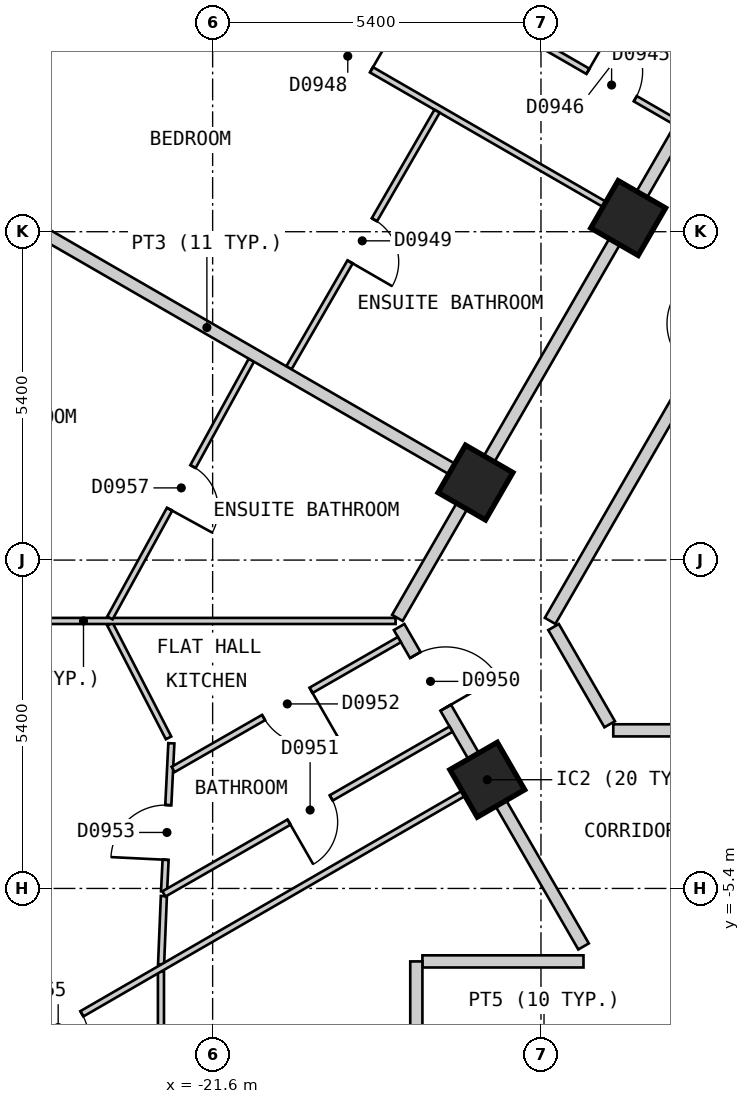
"""IFC4 building model, lengths in metres.
Left out: names, types, materials, properties, quantities, classifications, styles, units other than length and angle.
Written with IfcOpenShell. Run it as: python <this file> out.ifc"""

import sys

from ifc_helpers import new_model, si_unit, direction, frame, frame_2d, origin, origin_2d, place, context, subcontext, project, spatial, polyline, rectangle, outline, extrude, element, fill, save


model = new_model("IFC4")
c1 = context("Model", 3, precision=1e-05, world=origin(), true_north=direction((0.0, 1.0)))
c2 = subcontext(c1, "Body", "Model", "MODEL_VIEW")
j1 = project(units=[si_unit("LENGTHUNIT", "METRE"), si_unit("PLANEANGLEUNIT", "RADIAN")], contexts=[c1])
p1 = place(None, origin())
s1 = spatial("IfcSite", under=j1, at=p1, CompositionType="ELEMENT")
p2 = place(p1, origin())
s2 = spatial("IfcBuilding", under=s1, at=p2, CompositionType="ELEMENT")
p3 = place(p2, frame((0.0, 0.0, 102.0)))
s3 = spatial("IfcBuildingStorey", under=s2, at=p3, CompositionType="ELEMENT", Elevation=102.0)
for number, where, z_axis, x_axis in (
    (1, (-17.083, -3.612, 0.0), (0.0, 0.0, 1.0), (0.5, -0.866, 0.0)),
    (2, (-14.766, 5.625, 0.0), (0.0, 0.0, 1.0), (-0.5, -0.866, 0.0)),
    (3, (-17.277, 1.275, 0.0), (0.0, 0.0, 1.0), (-0.5, -0.866, 0.0)),
):
    element("IfcColumn", number, at=place(p3, frame(where, z_axis=z_axis, x_axis=x_axis)), inside=s3, PredefinedType="COLUMN", context=c2, shape_type="SweptSolid", body=[
        extrude(rectangle(XDim=0.9, YDim=0.9, at=origin_2d()), origin(), (0.0, 0.0, 1.0), 3.0),
    ])
p4 = place(p3, frame((-15.747, 24.425, 0.0), z_axis=(0.0, 0.0, 1.0), x_axis=(-0.500027479704, -0.866009537788, 0.0)))
e4 = element("IfcWall", 4, at=p4, inside=s3, PredefinedType="SOLIDWALL", context=c2, shape_type="SweptSolid", body=[
    extrude(outline(polyline([(0.0, -0.15), (26.559, -0.15), (26.478, 0.15), (0.08, 0.15), (0.0, -0.15)])), origin(), (0.0, 0.0, 1.0), 2.7),
])
p5 = place(p4, frame((2.483, 0.0, 0.15)))
e5 = element("IfcOpeningElement", 5, at=p5, cuts=e4, PredefinedType="OPENING", context=c2, shape_type="SweptSolid", body=[
    extrude(rectangle(XDim=1.5, YDim=2.1, at=frame_2d((0.75, 1.05))), frame((0.0, 0.16, 0.0), z_axis=(0.0, -1.0, 0.0), x_axis=(1.0, 0.0, 0.0)), (0.0, 0.0, 1.0), 0.32),
])
p6 = place(p4, frame((7.506, 0.0, 0.15)))
e6 = element("IfcOpeningElement", 6, at=p6, cuts=e4, PredefinedType="OPENING", context=c2, shape_type="SweptSolid", body=[
    extrude(rectangle(XDim=1.5, YDim=2.1, at=frame_2d((0.75, 1.05))), frame((0.0, 0.16, 0.0), z_axis=(0.0, -1.0, 0.0), x_axis=(1.0, 0.0, 0.0)), (0.0, 0.0, 1.0), 0.32),
])
p7 = place(p4, frame((12.529, 0.0, 0.15)))
e7 = element("IfcOpeningElement", 7, at=p7, cuts=e4, PredefinedType="OPENING", context=c2, shape_type="SweptSolid", body=[
    extrude(rectangle(XDim=1.5, YDim=2.1, at=frame_2d((0.75, 1.05))), frame((0.0, 0.16, 0.0), z_axis=(0.0, -1.0, 0.0), x_axis=(1.0, 0.0, 0.0)), (0.0, 0.0, 1.0), 0.32),
])
p8 = place(p4, frame((17.552, 0.0, 0.15)))
e8 = element("IfcOpeningElement", 8, at=p8, cuts=e4, PredefinedType="OPENING", context=c2, shape_type="SweptSolid", body=[
    extrude(rectangle(XDim=1.5, YDim=2.1, at=frame_2d((0.75, 1.05))), frame((0.0, 0.16, 0.0), z_axis=(0.0, -1.0, 0.0), x_axis=(1.0, 0.0, 0.0)), (0.0, 0.0, 1.0), 0.32),
])
p9 = place(p4, frame((22.575, 0.0, 0.15)))
e9 = element("IfcOpeningElement", 9, at=p9, cuts=e4, PredefinedType="OPENING", context=c2, shape_type="SweptSolid", body=[
    extrude(rectangle(XDim=1.5, YDim=2.1, at=frame_2d((0.75, 1.05))), frame((0.0, 0.16, 0.0), z_axis=(0.0, -1.0, 0.0), x_axis=(1.0, 0.0, 0.0)), (0.0, 0.0, 1.0), 0.32),
])
p10 = place(p3, frame((-29.027, -3.425, 0.0), z_axis=(0.0, 0.0, 1.0), x_axis=(0.500035407905, -0.866004960056, 0.0)))
e10 = element("IfcWall", 10, at=p10, inside=s3, PredefinedType="SOLIDWALL", context=c2, shape_type="SweptSolid", body=[
    extrude(outline(polyline([(0.0, -0.15), (23.094, -0.15), (23.014, 0.15), (0.08, 0.15), (0.0, -0.15)])), origin(), (0.0, 0.0, 1.0), 2.7),
])
p11 = place(p10, frame((2.677, 0.0, 0.15)))
e11 = element("IfcOpeningElement", 11, at=p11, cuts=e10, PredefinedType="OPENING", context=c2, shape_type="SweptSolid", body=[
    extrude(rectangle(XDim=1.5, YDim=2.1, at=frame_2d((0.75, 1.05))), frame((0.0, 0.16, 0.0), z_axis=(0.0, -1.0, 0.0), x_axis=(1.0, 0.0, 0.0)), (0.0, 0.0, 1.0), 0.32),
])
p12 = place(p10, frame((8.091, 0.0, 0.15)))
e12 = element("IfcOpeningElement", 12, at=p12, cuts=e10, PredefinedType="OPENING", context=c2, shape_type="SweptSolid", body=[
    extrude(rectangle(XDim=1.5, YDim=2.1, at=frame_2d((0.75, 1.05))), frame((0.0, 0.16, 0.0), z_axis=(0.0, -1.0, 0.0), x_axis=(1.0, 0.0, 0.0)), (0.0, 0.0, 1.0), 0.32),
])
p13 = place(p10, frame((13.504, 0.0, 0.15)))
e13 = element("IfcOpeningElement", 13, at=p13, cuts=e10, PredefinedType="OPENING", context=c2, shape_type="SweptSolid", body=[
    extrude(rectangle(XDim=1.5, YDim=2.1, at=frame_2d((0.75, 1.05))), frame((0.0, 0.16, 0.0), z_axis=(0.0, -1.0, 0.0), x_axis=(1.0, 0.0, 0.0)), (0.0, 0.0, 1.0), 0.32),
])
p14 = place(p10, frame((18.917, 0.0, 0.15)))
e14 = element("IfcOpeningElement", 14, at=p14, cuts=e10, PredefinedType="OPENING", context=c2, shape_type="SweptSolid", body=[
    extrude(rectangle(XDim=1.5, YDim=2.1, at=frame_2d((0.75, 1.05))), frame((0.0, 0.16, 0.0), z_axis=(0.0, -1.0, 0.0), x_axis=(1.0, 0.0, 0.0)), (0.0, 0.0, 1.0), 0.32),
])
p15 = place(p3, frame((-15.993, -1.101, 0.0), z_axis=(0.0, 0.0, 1.0), x_axis=(0.499894174133, -0.866086493757, 0.0)))
e15 = element("IfcWall", 15, at=p15, inside=s3, PredefinedType="PARTITIONING", context=c2, shape_type="SweptSolid", body=[
    extrude(rectangle(XDim=1.846, YDim=0.2, at=frame_2d((0.923, 0.0))), origin(), (0.0, 0.0, 1.0), 2.7),
])
p16 = place(p3, frame((-18.533, -1.101, 0.0), z_axis=(0.0, 0.0, 1.0), x_axis=(0.500022085096, -0.866012652573, 0.0)))
e16 = element("IfcWall", 16, at=p16, inside=s3, PredefinedType="PARTITIONING", context=c2, shape_type="SweptSolid", body=[
    extrude(rectangle(XDim=6.066, YDim=0.2, at=frame_2d((3.033, 0.0))), origin(), (0.0, 0.0, 1.0), 2.7),
])
p17 = place(p16, frame((0.532, 0.0, 0.0)))
e17 = element("IfcOpeningElement", 17, at=p17, cuts=e16, PredefinedType="OPENING", context=c2, shape_type="SweptSolid", body=[
    extrude(rectangle(XDim=1.0, YDim=2.1, at=frame_2d((0.5, 1.05))), frame((0.0, 0.11, 0.0), z_axis=(0.0, -1.0, 0.0), x_axis=(1.0, 0.0, 0.0)), (0.0, 0.0, 1.0), 0.22),
])
p18 = place(p3, frame((-18.15, -6.6, 0.0), z_axis=(0.0, 0.0, 1.0), x_axis=(1.0, 0.0, 0.0)))
e18 = element("IfcWall", 18, at=p18, inside=s3, PredefinedType="PARTITIONING", context=c2, shape_type="SweptSolid", body=[
    extrude(rectangle(XDim=2.649, YDim=0.2, at=frame_2d((1.324, 0.0))), origin(), (0.0, 0.0, 1.0), 2.7),
])
p19 = place(p3, frame((-15.011, -2.8, 0.0), z_axis=(0.0, 0.0, 1.0), x_axis=(1.0, 0.0, 0.0)))
e19 = element("IfcWall", 19, at=p19, inside=s3, PredefinedType="PARTITIONING", context=c2, shape_type="SweptSolid", body=[
    extrude(rectangle(XDim=7.982, YDim=0.2, at=frame_2d((3.991, 0.0))), origin(), (0.0, 0.0, 1.0), 2.7),
])
p20 = place(p3, frame((-16.05, -1.0, 0.0), z_axis=(0.0, 0.0, 1.0), x_axis=(0.499962449088, 0.866047082728, 0.0)))
e20 = element("IfcWall", 20, at=p20, inside=s3, PredefinedType="PARTITIONING", context=c2, shape_type="SweptSolid", body=[
    extrude(rectangle(XDim=10.391, YDim=0.2, at=frame_2d((5.195, 0.0))), origin(), (0.0, 0.0, 1.0), 2.7),
])
p21 = place(p20, frame((4.745, 0.0, 0.0)))
e21 = element("IfcOpeningElement", 21, at=p21, cuts=e20, PredefinedType="OPENING", context=c2, shape_type="SweptSolid", body=[
    extrude(rectangle(XDim=0.9, YDim=2.1, at=frame_2d((0.45, 1.05))), frame((0.0, 0.11, 0.0), z_axis=(0.0, -1.0, 0.0), x_axis=(1.0, 0.0, 0.0)), (0.0, 0.0, 1.0), 0.22),
])
p22 = place(p3, frame((-18.562, -0.951, 0.0), z_axis=(0.0, 0.0, 1.0), x_axis=(0.499987097491, 0.866032852923, 0.0)))
e22 = element("IfcWall", 22, at=p22, inside=s3, PredefinedType="PARTITIONING", context=c2, shape_type="SweptSolid", body=[
    extrude(rectangle(XDim=20.15, YDim=0.2, at=frame_2d((10.075, 0.0))), origin(), (0.0, 0.0, 1.0), 2.7),
])
p23 = place(p22, frame((14.627, 0.0, 0.0)))
e23 = element("IfcOpeningElement", 23, at=p23, cuts=e22, PredefinedType="OPENING", context=c2, shape_type="SweptSolid", body=[
    extrude(rectangle(XDim=1.0, YDim=2.1, at=frame_2d((0.5, 1.05))), frame((0.0, 0.11, 0.0), z_axis=(0.0, -1.0, 0.0), x_axis=(1.0, 0.0, 0.0)), (0.0, 0.0, 1.0), 0.22),
])
p24 = place(p22, frame((9.604, 0.0, 0.0)))
e24 = element("IfcOpeningElement", 24, at=p24, cuts=e22, PredefinedType="OPENING", context=c2, shape_type="SweptSolid", body=[
    extrude(rectangle(XDim=1.0, YDim=2.1, at=frame_2d((0.5, 1.05))), frame((0.0, 0.11, 0.0), z_axis=(0.0, -1.0, 0.0), x_axis=(1.0, 0.0, 0.0)), (0.0, 0.0, 1.0), 0.22),
])
p25 = place(p3, frame((-18.25, -14.386, 0.0), z_axis=(0.0, 0.0, 1.0), x_axis=(0.0, 1.0, 0.0)))
e25 = element("IfcWall", 25, at=p25, inside=s3, PredefinedType="PARTITIONING", context=c2, shape_type="SweptSolid", body=[
    extrude(rectangle(XDim=7.786, YDim=0.2, at=frame_2d((3.893, 0.0))), origin(), (0.0, 0.0, 1.0), 2.7),
])
p26 = place(p25, frame((0.34, 0.0, 0.0)))
e26 = element("IfcOpeningElement", 26, at=p26, cuts=e25, PredefinedType="OPENING", context=c2, shape_type="SweptSolid", body=[
    extrude(rectangle(XDim=1.0, YDim=2.1, at=frame_2d((0.5, 1.05))), frame((0.0, 0.11, 0.0), z_axis=(0.0, -1.0, 0.0), x_axis=(1.0, 0.0, 0.0)), (0.0, 0.0, 1.0), 0.22),
])
p27 = place(p3, frame((-23.289, -1.054, 0.0), z_axis=(0.0, 0.0, 1.0), x_axis=(0.458226112305, -0.888835659726, 0.0)))
e27 = element("IfcWall", 27, at=p27, inside=s3, PredefinedType="PARTITIONING", context=c2, shape_type="SweptSolid", body=[
    extrude(rectangle(XDim=2.104, YDim=0.1, at=frame_2d((1.052, 0.0))), origin(), (0.0, 0.0, 1.0), 2.7),
])
p28 = place(p3, frame((-16.146, 8.452, 0.0), z_axis=(0.0, 0.0, 1.0), x_axis=(0.865983051302, -0.500073349477, 0.0)))
e28 = element("IfcWall", 28, at=p28, inside=s3, PredefinedType="PARTITIONING", context=c2, shape_type="SweptSolid", body=[
    extrude(rectangle(XDim=2.509, YDim=0.1, at=frame_2d((1.255, 0.0))), origin(), (0.0, 0.0, 1.0), 2.7),
])
p29 = place(p28, frame((0.829, 0.0, 0.0)))
e29 = element("IfcOpeningElement", 29, at=p29, cuts=e28, PredefinedType="OPENING", context=c2, shape_type="SweptSolid", body=[
    extrude(rectangle(XDim=0.9, YDim=2.1, at=frame_2d((0.45, 1.05))), frame((0.0, 0.06, 0.0), z_axis=(0.0, -1.0, 0.0), x_axis=(1.0, 0.0, 0.0)), (0.0, 0.0, 1.0), 0.12),
])
p30 = place(p3, frame((-23.513, 10.675, 0.0), z_axis=(0.0, 0.0, 1.0), x_axis=(0.866041268327, -0.499972520799, 0.0)))
e30 = element("IfcWall", 30, at=p30, inside=s3, PredefinedType="PARTITIONING", context=c2, shape_type="SweptSolid", body=[
    extrude(rectangle(XDim=10.0, YDim=0.1, at=frame_2d((5.0, 0.0))), origin(), (0.0, 0.0, 1.0), 2.7),
])
p31 = place(p30, frame((4.325, 0.0, 0.0)))
e31 = element("IfcOpeningElement", 31, at=p31, cuts=e30, PredefinedType="OPENING", context=c2, shape_type="SweptSolid", body=[
    extrude(rectangle(XDim=0.9, YDim=2.1, at=frame_2d((0.45, 1.05))), frame((0.0, 0.06, 0.0), z_axis=(0.0, -1.0, 0.0), x_axis=(1.0, 0.0, 0.0)), (0.0, 0.0, 1.0), 0.12),
])
p32 = place(p3, frame((-28.857, -1.001, 0.0), z_axis=(0.0, 0.0, 1.0), x_axis=(1.0, 0.0, 0.0)))
e32 = element("IfcWall", 32, at=p32, inside=s3, PredefinedType="PARTITIONING", context=c2, shape_type="SweptSolid", body=[
    extrude(rectangle(XDim=10.266, YDim=0.1, at=frame_2d((5.133, 0.0))), origin(), (0.0, 0.0, 1.0), 2.7),
])
p33 = place(p32, frame((2.32, 0.0, 0.0)))
e33 = element("IfcOpeningElement", 33, at=p33, cuts=e32, PredefinedType="OPENING", context=c2, shape_type="SweptSolid", body=[
    extrude(rectangle(XDim=0.9, YDim=2.1, at=frame_2d((0.45, 1.05))), frame((0.0, 0.06, 0.0), z_axis=(0.0, -1.0, 0.0), x_axis=(1.0, 0.0, 0.0)), (0.0, 0.0, 1.0), 0.12),
])
p34 = place(p3, frame((-20.345, 3.162, 0.0), z_axis=(0.0, 0.0, 1.0), x_axis=(0.499943653708, 0.866057932887, 0.0)))
e34 = element("IfcWall", 34, at=p34, inside=s3, PredefinedType="PARTITIONING", context=c2, shape_type="SweptSolid", body=[
    extrude(rectangle(XDim=4.873, YDim=0.1, at=frame_2d((2.436, 0.0))), origin(), (0.0, 0.0, 1.0), 2.7),
])
p35 = place(p34, frame((2.011, 0.0, 0.0)))
e35 = element("IfcOpeningElement", 35, at=p35, cuts=e34, PredefinedType="OPENING", context=c2, shape_type="SweptSolid", body=[
    extrude(rectangle(XDim=0.8, YDim=2.1, at=frame_2d((0.4, 1.05))), frame((0.0, 0.06, 0.0), z_axis=(0.0, -1.0, 0.0), x_axis=(1.0, 0.0, 0.0)), (0.0, 0.0, 1.0), 0.12),
])
p36 = place(p3, frame((-23.289, -0.951, 0.0), z_axis=(0.0, 0.0, 1.0), x_axis=(0.481164463081, 0.876630343684, 0.0)))
e36 = element("IfcWall", 36, at=p36, inside=s3, PredefinedType="PARTITIONING", context=c2, shape_type="SweptSolid", body=[
    extrude(rectangle(XDim=4.834, YDim=0.1, at=frame_2d((2.417, 0.0))), origin(), (0.0, 0.0, 1.0), 2.7),
])
p37 = place(p36, frame((2.039, 0.0, 0.0)))
e37 = element("IfcOpeningElement", 37, at=p37, cuts=e36, PredefinedType="OPENING", context=c2, shape_type="SweptSolid", body=[
    extrude(rectangle(XDim=0.8, YDim=2.1, at=frame_2d((0.4, 1.05))), frame((0.0, 0.06, 0.0), z_axis=(0.0, -1.0, 0.0), x_axis=(1.0, 0.0, 0.0)), (0.0, 0.0, 1.0), 0.12),
])
p38 = place(p3, frame((-22.399, -5.45, 0.0), z_axis=(0.0, 0.0, 1.0), x_axis=(0.049129140995, 0.998792434646, 0.0)))
e38 = element("IfcWall", 38, at=p38, inside=s3, PredefinedType="PARTITIONING", context=c2, shape_type="SweptSolid", body=[
    extrude(rectangle(XDim=2.44, YDim=0.1, at=frame_2d((1.22, 0.0))), origin(), (0.0, 0.0, 1.0), 2.7),
])
p39 = place(p38, frame((0.522, 0.0, 0.0)))
e39 = element("IfcOpeningElement", 39, at=p39, cuts=e38, PredefinedType="OPENING", context=c2, shape_type="SweptSolid", body=[
    extrude(rectangle(XDim=0.9, YDim=2.1, at=frame_2d((0.45, 1.05))), frame((0.0, 0.06, 0.0), z_axis=(0.0, -1.0, 0.0), x_axis=(1.0, 0.0, 0.0)), (0.0, 0.0, 1.0), 0.12),
])
p40 = place(p3, frame((-22.448, -6.651, 0.0), z_axis=(0.0, 0.0, 1.0), x_axis=(0.040729401597, 0.99917021365, 0.0)))
e40 = element("IfcWall", 40, at=p40, inside=s3, PredefinedType="PARTITIONING", context=c2, shape_type="SweptSolid", body=[
    extrude(rectangle(XDim=1.127, YDim=0.1, at=frame_2d((0.563, 0.0))), origin(), (0.0, 0.0, 1.0), 2.7),
])
p41 = place(p3, frame((-22.45, -12.846, 0.0), z_axis=(0.0, 0.0, 1.0), x_axis=(0.0, 1.0, 0.0)))
e41 = element("IfcWall", 41, at=p41, inside=s3, PredefinedType="PARTITIONING", context=c2, shape_type="SweptSolid", body=[
    extrude(rectangle(XDim=6.078, YDim=0.1, at=frame_2d((3.039, 0.0))), origin(), (0.0, 0.0, 1.0), 2.7),
])
p42 = place(p41, frame((2.61, 0.0, 0.0)))
e42 = element("IfcOpeningElement", 42, at=p42, cuts=e41, PredefinedType="OPENING", context=c2, shape_type="SweptSolid", body=[
    extrude(rectangle(XDim=0.8, YDim=2.1, at=frame_2d((0.4, 1.05))), frame((0.0, 0.06, 0.0), z_axis=(0.0, -1.0, 0.0), x_axis=(1.0, 0.0, 0.0)), (0.0, 0.0, 1.0), 0.12),
])
p43 = place(p3, frame((-25.83, -8.662, 0.0), z_axis=(0.0, 0.0, 1.0), x_axis=(0.866022959057, 0.500004234368, 0.0)))
e43 = element("IfcWall", 43, at=p43, inside=s3, PredefinedType="PARTITIONING", context=c2, shape_type="SweptSolid", body=[
    extrude(rectangle(XDim=10.0, YDim=0.1, at=frame_2d((5.0, 0.0))), origin(), (0.0, 0.0, 1.0), 2.7),
])
p44 = place(p43, frame((1.501, 0.0, 0.0)))
e44 = element("IfcOpeningElement", 44, at=p44, cuts=e43, PredefinedType="OPENING", context=c2, shape_type="SweptSolid", body=[
    extrude(rectangle(XDim=0.9, YDim=2.1, at=frame_2d((0.45, 1.05))), frame((0.0, 0.06, 0.0), z_axis=(0.0, -1.0, 0.0), x_axis=(1.0, 0.0, 0.0)), (0.0, 0.0, 1.0), 0.12),
])
p45 = place(p3, frame((-22.401, -5.49, 0.0), z_axis=(0.0, 0.0, 1.0), x_axis=(0.867314404256, 0.497760709749, 0.0)))
e45 = element("IfcWall", 45, at=p45, inside=s3, PredefinedType="PARTITIONING", context=c2, shape_type="SweptSolid", body=[
    extrude(rectangle(XDim=5.444, YDim=0.1, at=frame_2d((2.722, 0.0))), origin(), (0.0, 0.0, 1.0), 2.7),
])
p46 = place(p45, frame((2.372, 0.0, 0.0)))
e46 = element("IfcOpeningElement", 46, at=p46, cuts=e45, PredefinedType="OPENING", context=c2, shape_type="SweptSolid", body=[
    extrude(rectangle(XDim=0.8, YDim=2.1, at=frame_2d((0.4, 1.05))), frame((0.0, 0.06, 0.0), z_axis=(0.0, -1.0, 0.0), x_axis=(1.0, 0.0, 0.0)), (0.0, 0.0, 1.0), 0.12),
])
p47 = place(p3, frame((-22.25, -3.443, 0.0), z_axis=(0.0, 0.0, 1.0), x_axis=(0.867362741349, 0.497676476156, 0.0)))
e47 = element("IfcWall", 47, at=p47, inside=s3, PredefinedType="PARTITIONING", context=c2, shape_type="SweptSolid", body=[
    extrude(rectangle(XDim=4.29, YDim=0.1, at=frame_2d((2.145, 0.0))), origin(), (0.0, 0.0, 1.0), 2.7),
])
p48 = place(p47, frame((1.715, 0.0, 0.0)))
e48 = element("IfcOpeningElement", 48, at=p48, cuts=e47, PredefinedType="OPENING", context=c2, shape_type="SweptSolid", body=[
    extrude(rectangle(XDim=0.9, YDim=2.1, at=frame_2d((0.45, 1.05))), frame((0.0, 0.06, 0.0), z_axis=(0.0, -1.0, 0.0), x_axis=(1.0, 0.0, 0.0)), (0.0, 0.0, 1.0), 0.12),
])
p49 = place(p3, frame((-26.025, 6.325, 0.0), z_axis=(0.0, 0.0, 1.0), x_axis=(0.866041268327, -0.499972520799, 0.0)))
e49 = element("IfcWall", 49, at=p49, inside=s3, PredefinedType="PARTITIONING", context=c2, shape_type="SweptSolid", body=[
    extrude(rectangle(XDim=10.0, YDim=0.2, at=frame_2d((5.0, 0.0))), origin(), (0.0, 0.0, 1.0), 2.7),
])
p50 = place(p29, origin())
e50 = element("IfcDoor", 50, at=p50, inside=s3, OperationType="SINGLE_SWING_LEFT", PredefinedType="DOOR", context=c2, shape_type="SweptSolid", body=[
    extrude(rectangle(XDim=0.9, YDim=2.1, at=frame_2d((0.45, 1.05))), frame((0.0, 0.025, 0.0), z_axis=(0.0, -1.0, 0.0), x_axis=(1.0, 0.0, 0.0)), (0.0, 0.0, 1.0), 0.05),
])
fill(e29, e50)
p51 = place(p31, origin())
e51 = element("IfcDoor", 51, at=p51, inside=s3, OperationType="SINGLE_SWING_RIGHT", PredefinedType="DOOR", context=c2, shape_type="SweptSolid", body=[
    extrude(rectangle(XDim=0.9, YDim=2.1, at=frame_2d((0.45, 1.05))), frame((0.0, 0.025, 0.0), z_axis=(0.0, -1.0, 0.0), x_axis=(1.0, 0.0, 0.0)), (0.0, 0.0, 1.0), 0.05),
])
fill(e31, e51)
p52 = place(p35, origin())
e52 = element("IfcDoor", 52, at=p52, inside=s3, OperationType="SINGLE_SWING_LEFT", PredefinedType="DOOR", context=c2, shape_type="SweptSolid", body=[
    extrude(rectangle(XDim=0.8, YDim=2.1, at=frame_2d((0.4, 1.05))), frame((0.0, 0.025, 0.0), z_axis=(0.0, -1.0, 0.0), x_axis=(1.0, 0.0, 0.0)), (0.0, 0.0, 1.0), 0.05),
])
fill(e35, e52)
p53 = place(p17, origin())
e53 = element("IfcDoor", 53, at=p53, inside=s3, OperationType="SINGLE_SWING_RIGHT", PredefinedType="DOOR", context=c2, shape_type="SweptSolid", body=[
    extrude(rectangle(XDim=1.0, YDim=2.1, at=frame_2d((0.5, 1.05))), frame((0.0, 0.025, 0.0), z_axis=(0.0, -1.0, 0.0), x_axis=(1.0, 0.0, 0.0)), (0.0, 0.0, 1.0), 0.05),
])
fill(e17, e53)
p54 = place(p46, origin())
e54 = element("IfcDoor", 54, at=p54, inside=s3, OperationType="SINGLE_SWING_LEFT", PredefinedType="DOOR", context=c2, shape_type="SweptSolid", body=[
    extrude(rectangle(XDim=0.8, YDim=2.1, at=frame_2d((0.4, 1.05))), frame((0.0, 0.025, 0.0), z_axis=(0.0, -1.0, 0.0), x_axis=(1.0, 0.0, 0.0)), (0.0, 0.0, 1.0), 0.05),
])
fill(e46, e54)
p55 = place(p48, origin())
e55 = element("IfcDoor", 55, at=p55, inside=s3, OperationType="SINGLE_SWING_RIGHT", PredefinedType="DOOR", context=c2, shape_type="SweptSolid", body=[
    extrude(rectangle(XDim=0.9, YDim=2.1, at=frame_2d((0.45, 1.05))), frame((0.0, 0.025, 0.0), z_axis=(0.0, -1.0, 0.0), x_axis=(1.0, 0.0, 0.0)), (0.0, 0.0, 1.0), 0.05),
])
fill(e48, e55)
p56 = place(p39, origin())
e56 = element("IfcDoor", 56, at=p56, inside=s3, OperationType="SINGLE_SWING_LEFT", PredefinedType="DOOR", context=c2, shape_type="SweptSolid", body=[
    extrude(rectangle(XDim=0.9, YDim=2.1, at=frame_2d((0.45, 1.05))), frame((0.0, 0.025, 0.0), z_axis=(0.0, -1.0, 0.0), x_axis=(1.0, 0.0, 0.0)), (0.0, 0.0, 1.0), 0.05),
])
fill(e39, e56)
p57 = place(p44, origin())
e57 = element("IfcDoor", 57, at=p57, inside=s3, OperationType="SINGLE_SWING_LEFT", PredefinedType="DOOR", context=c2, shape_type="SweptSolid", body=[
    extrude(rectangle(XDim=0.9, YDim=2.1, at=frame_2d((0.45, 1.05))), frame((0.0, 0.025, 0.0), z_axis=(0.0, -1.0, 0.0), x_axis=(1.0, 0.0, 0.0)), (0.0, 0.0, 1.0), 0.05),
])
fill(e44, e57)
p58 = place(p37, origin())
e58 = element("IfcDoor", 58, at=p58, inside=s3, OperationType="SINGLE_SWING_LEFT", PredefinedType="DOOR", context=c2, shape_type="SweptSolid", body=[
    extrude(rectangle(XDim=0.8, YDim=2.1, at=frame_2d((0.4, 1.05))), frame((0.0, 0.025, 0.0), z_axis=(0.0, -1.0, 0.0), x_axis=(1.0, 0.0, 0.0)), (0.0, 0.0, 1.0), 0.05),
])
fill(e37, e58)
save(model, sys.argv[1])
